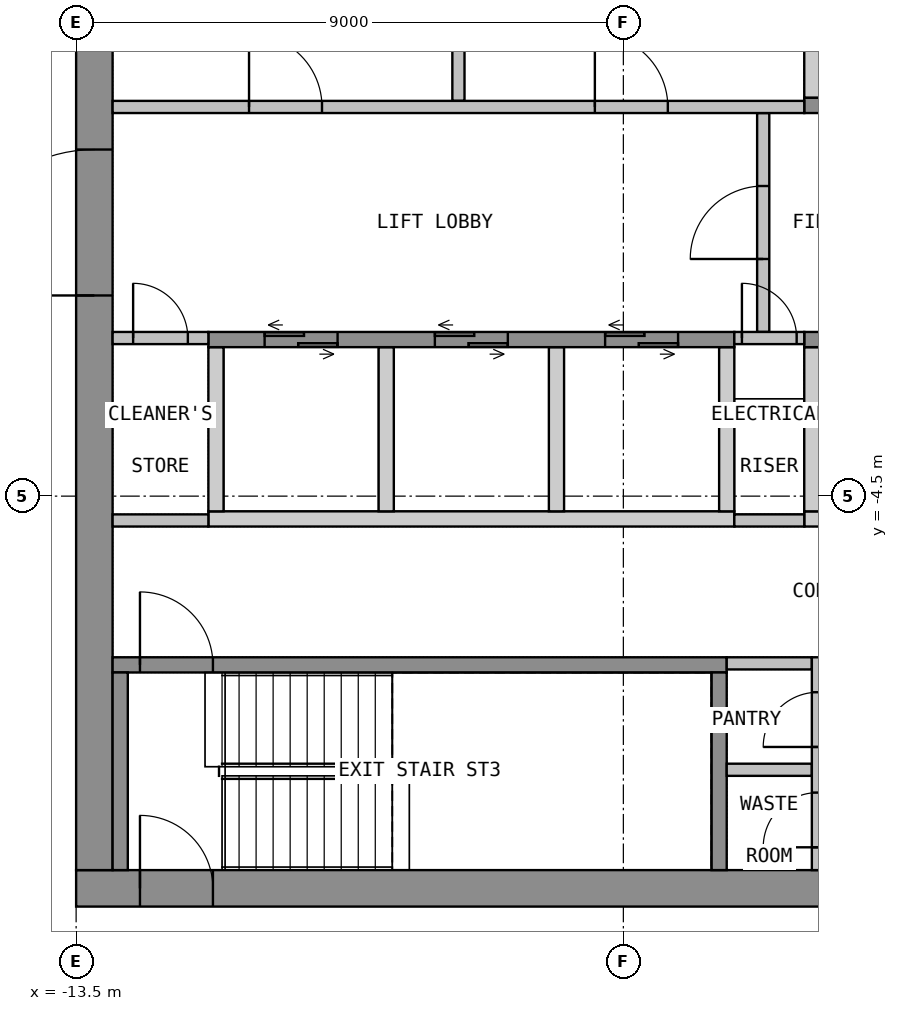
"""IFC4 building model, lengths in metres.
Left out: names, types, materials, properties, quantities, classifications, styles, units other than length and angle.
Written with IfcOpenShell. Run it as: python <this file> out.ifc"""

import sys

from ifc_helpers import new_model, si_unit, direction, frame, frame_2d, origin, place, context, subcontext, project, spatial, polyline, rectangle, outline, extrude, element, fill, save


model = new_model("IFC4")
c1 = context("Model", 3, precision=1e-05, world=origin(), true_north=direction((0.0, 1.0)))
c2 = subcontext(c1, "Body", "Model", "MODEL_VIEW")
j1 = project(units=[si_unit("LENGTHUNIT", "METRE"), si_unit("PLANEANGLEUNIT", "RADIAN")], contexts=[c1])
p1 = place(None, origin())
s1 = spatial("IfcSite", under=j1, at=p1, CompositionType="ELEMENT")
p2 = place(p1, origin())
s2 = spatial("IfcBuilding", under=s1, at=p2, CompositionType="ELEMENT")
p3 = place(p2, frame((0.0, 0.0, 286.5)))
s3 = spatial("IfcBuildingStorey", under=s2, at=p3, CompositionType="ELEMENT", Elevation=286.5)
p4 = place(p3, frame((-13.5, -10.95, 0.0), z_axis=(0.0, 0.0, 1.0), x_axis=(1.0, 0.0, 0.0)))
e1 = element("IfcWall", 1, at=p4, inside=s3, PredefinedType="SHEAR", context=c2, shape_type="SweptSolid", body=[
    extrude(rectangle(XDim=27.0, YDim=0.6, at=frame_2d((13.5, 0.0))), origin(), (0.0, 0.0, 1.0), 3.575),
])
p5 = place(p4, frame((12.3, 0.0, 0.0)))
e2 = element("IfcOpeningElement", 2, at=p5, cuts=e1, PredefinedType="OPENING", context=c2, shape_type="SweptSolid", body=[
    extrude(rectangle(XDim=2.4, YDim=2.1, at=frame_2d((1.2, 1.05))), frame((0.0, 0.31, 0.0), z_axis=(0.0, -1.0, 0.0), x_axis=(1.0, 0.0, 0.0)), (0.0, 0.0, 1.0), 0.62),
])
p6 = place(p4, frame((1.05, 0.0, 0.0)))
e3 = element("IfcOpeningElement", 3, at=p6, cuts=e1, PredefinedType="OPENING", context=c2, shape_type="SweptSolid", body=[
    extrude(rectangle(XDim=1.2, YDim=2.1, at=frame_2d((0.6, 1.05))), frame((0.0, 0.31, 0.0), z_axis=(0.0, -1.0, 0.0), x_axis=(1.0, 0.0, 0.0)), (0.0, 0.0, 1.0), 0.62),
])
p7 = place(p4, frame((24.75, 0.0, 0.0)))
e4 = element("IfcOpeningElement", 4, at=p7, cuts=e1, PredefinedType="OPENING", context=c2, shape_type="SweptSolid", body=[
    extrude(rectangle(XDim=1.2, YDim=2.1, at=frame_2d((0.6, 1.05))), frame((0.0, 0.31, 0.0), z_axis=(0.0, -1.0, 0.0), x_axis=(1.0, 0.0, 0.0)), (0.0, 0.0, 1.0), 0.62),
])
p8 = place(p3, frame((-13.2, -10.65, 0.0), z_axis=(0.0, 0.0, 1.0), x_axis=(0.0, 1.0, 0.0)))
e5 = element("IfcWall", 5, at=p8, inside=s3, PredefinedType="SHEAR", context=c2, shape_type="SweptSolid", body=[
    extrude(rectangle(XDim=21.3, YDim=0.6, at=frame_2d((10.65, 0.0))), origin(), (0.0, 0.0, 1.0), 3.575),
])
p9 = place(p8, frame((9.45, 0.0, 0.0)))
e6 = element("IfcOpeningElement", 6, at=p9, cuts=e5, PredefinedType="OPENING", context=c2, shape_type="SweptSolid", body=[
    extrude(rectangle(XDim=2.4, YDim=2.1, at=frame_2d((1.2, 1.05))), frame((0.0, 0.31, 0.0), z_axis=(0.0, -1.0, 0.0), x_axis=(1.0, 0.0, 0.0)), (0.0, 0.0, 1.0), 0.62),
])
p10 = place(p3, origin())
e7 = element("IfcWall", 7, at=p10, inside=s3, PredefinedType="SHEAR", context=c2, shape_type="SweptSolid", body=[
    extrude(outline(polyline([(-1.525, 2.05), (-1.275, 2.05), (-1.275, 4.75), (-1.525, 4.75), (-1.525, 2.05)])), origin(), (0.0, 0.0, 1.0), 3.575),
])
p11 = place(p3, frame((-1.525, 1.925, 0.0), z_axis=(0.0, 0.0, 1.0), x_axis=(1.0, 0.0, 0.0)))
e8 = element("IfcWall", 8, at=p11, inside=s3, PredefinedType="SHEAR", context=c2, shape_type="SweptSolid", body=[
    extrude(rectangle(XDim=3.05, YDim=0.25, at=frame_2d((1.525, 0.0))), origin(), (0.0, 0.0, 1.0), 3.575),
])
p12 = place(p11, frame((0.925, 0.0, 0.0)))
e9 = element("IfcOpeningElement", 9, at=p12, cuts=e8, PredefinedType="OPENING", context=c2, shape_type="SweptSolid", body=[
    extrude(rectangle(XDim=1.2, YDim=2.1, at=frame_2d((0.6, 1.05))), frame((0.0, 0.135, 0.0), z_axis=(0.0, -1.0, 0.0), x_axis=(1.0, 0.0, 0.0)), (0.0, 0.0, 1.0), 0.27),
])
p13 = place(p3, origin())
e10 = element("IfcWall", 10, at=p13, inside=s3, PredefinedType="SHEAR", context=c2, shape_type="SweptSolid", body=[
    extrude(outline(polyline([(-11.325, -5.0), (-2.675, -5.0), (-2.675, -4.75), (-11.325, -4.75), (-11.325, -5.0)])), origin(), (0.0, 0.0, 1.0), 3.575),
])
p14 = place(p3, origin())
e11 = element("IfcWall", 11, at=p14, inside=s3, PredefinedType="SHEAR", context=c2, shape_type="SweptSolid", body=[
    extrude(outline(polyline([(-1.525, -5.0), (4.325, -5.0), (4.325, -4.75), (-1.525, -4.75), (-1.525, -5.0)])), origin(), (0.0, 0.0, 1.0), 3.575),
])
p15 = place(p3, origin())
e12 = element("IfcWall", 12, at=p15, inside=s3, PredefinedType="SHEAR", context=c2, shape_type="SweptSolid", body=[
    extrude(outline(polyline([(-11.325, -4.75), (-11.075, -4.75), (-11.075, -2.05), (-11.325, -2.05), (-11.325, -4.75)])), origin(), (0.0, 0.0, 1.0), 3.575),
])
p16 = place(p3, origin())
e13 = element("IfcWall", 13, at=p16, inside=s3, PredefinedType="SHEAR", context=c2, shape_type="SweptSolid", body=[
    extrude(outline(polyline([(-8.525, -4.75), (-8.275, -4.75), (-8.275, -2.05), (-8.525, -2.05), (-8.525, -4.75)])), origin(), (0.0, 0.0, 1.0), 3.575),
])
p17 = place(p3, origin())
e14 = element("IfcWall", 14, at=p17, inside=s3, PredefinedType="SHEAR", context=c2, shape_type="SweptSolid", body=[
    extrude(outline(polyline([(-5.725, -4.75), (-5.475, -4.75), (-5.475, -2.05), (-5.725, -2.05), (-5.725, -4.75)])), origin(), (0.0, 0.0, 1.0), 3.575),
])
p18 = place(p3, origin())
e15 = element("IfcWall", 15, at=p18, inside=s3, PredefinedType="SHEAR", context=c2, shape_type="SweptSolid", body=[
    extrude(outline(polyline([(-2.925, -4.75), (-2.675, -4.75), (-2.675, -2.05), (-2.925, -2.05), (-2.925, -4.75)])), origin(), (0.0, 0.0, 1.0), 3.575),
])
p19 = place(p3, origin())
e16 = element("IfcWall", 16, at=p19, inside=s3, PredefinedType="SHEAR", context=c2, shape_type="SweptSolid", body=[
    extrude(outline(polyline([(-1.525, -4.75), (-1.275, -4.75), (-1.275, -2.05), (-1.525, -2.05), (-1.525, -4.75)])), origin(), (0.0, 0.0, 1.0), 3.575),
])
p20 = place(p3, frame((-11.325, -1.925, 0.0), z_axis=(0.0, 0.0, 1.0), x_axis=(1.0, 0.0, 0.0)))
e17 = element("IfcWall", 17, at=p20, inside=s3, PredefinedType="SHEAR", context=c2, shape_type="SweptSolid", body=[
    extrude(rectangle(XDim=8.65, YDim=0.25, at=frame_2d((4.325, 0.0))), origin(), (0.0, 0.0, 1.0), 3.575),
])
p21 = place(p20, frame((0.925, 0.0, 0.0)))
e18 = element("IfcOpeningElement", 18, at=p21, cuts=e17, PredefinedType="OPENING", context=c2, shape_type="SweptSolid", body=[
    extrude(rectangle(XDim=1.2, YDim=2.1, at=frame_2d((0.6, 1.05))), frame((0.0, 0.135, 0.0), z_axis=(0.0, -1.0, 0.0), x_axis=(1.0, 0.0, 0.0)), (0.0, 0.0, 1.0), 0.27),
])
p22 = place(p20, frame((3.725, 0.0, 0.0)))
e19 = element("IfcOpeningElement", 19, at=p22, cuts=e17, PredefinedType="OPENING", context=c2, shape_type="SweptSolid", body=[
    extrude(rectangle(XDim=1.2, YDim=2.1, at=frame_2d((0.6, 1.05))), frame((0.0, 0.135, 0.0), z_axis=(0.0, -1.0, 0.0), x_axis=(1.0, 0.0, 0.0)), (0.0, 0.0, 1.0), 0.27),
])
p23 = place(p20, frame((6.525, 0.0, 0.0)))
e20 = element("IfcOpeningElement", 20, at=p23, cuts=e17, PredefinedType="OPENING", context=c2, shape_type="SweptSolid", body=[
    extrude(rectangle(XDim=1.2, YDim=2.1, at=frame_2d((0.6, 1.05))), frame((0.0, 0.135, 0.0), z_axis=(0.0, -1.0, 0.0), x_axis=(1.0, 0.0, 0.0)), (0.0, 0.0, 1.0), 0.27),
])
p24 = place(p3, frame((-1.525, -1.925, 0.0), z_axis=(0.0, 0.0, 1.0), x_axis=(1.0, 0.0, 0.0)))
e21 = element("IfcWall", 21, at=p24, inside=s3, PredefinedType="SHEAR", context=c2, shape_type="SweptSolid", body=[
    extrude(rectangle(XDim=5.85, YDim=0.25, at=frame_2d((2.925, 0.0))), origin(), (0.0, 0.0, 1.0), 3.575),
])
p25 = place(p24, frame((0.925, 0.0, 0.0)))
e22 = element("IfcOpeningElement", 22, at=p25, cuts=e21, PredefinedType="OPENING", context=c2, shape_type="SweptSolid", body=[
    extrude(rectangle(XDim=1.2, YDim=2.1, at=frame_2d((0.6, 1.05))), frame((0.0, 0.135, 0.0), z_axis=(0.0, -1.0, 0.0), x_axis=(1.0, 0.0, 0.0)), (0.0, 0.0, 1.0), 0.27),
])
p26 = place(p24, frame((3.725, 0.0, 0.0)))
e23 = element("IfcOpeningElement", 23, at=p26, cuts=e21, PredefinedType="OPENING", context=c2, shape_type="SweptSolid", body=[
    extrude(rectangle(XDim=1.2, YDim=2.1, at=frame_2d((0.6, 1.05))), frame((0.0, 0.135, 0.0), z_axis=(0.0, -1.0, 0.0), x_axis=(1.0, 0.0, 0.0)), (0.0, 0.0, 1.0), 0.27),
])
p27 = place(p3, frame((-2.2, -1.8, 0.0), z_axis=(0.0, 0.0, 1.0), x_axis=(0.0, 1.0, 0.0)))
e24 = element("IfcWall", 24, at=p27, inside=s3, PredefinedType="PARTITIONING", context=c2, shape_type="SweptSolid", body=[
    extrude(rectangle(XDim=3.6, YDim=0.2, at=frame_2d((1.8, 0.0))), origin(), (0.0, 0.0, 1.0), 3.575),
])
p28 = place(p27, frame((1.2, 0.0, 0.0)))
e25 = element("IfcOpeningElement", 25, at=p28, cuts=e24, PredefinedType="OPENING", context=c2, shape_type="SweptSolid", body=[
    extrude(rectangle(XDim=1.2, YDim=2.1, at=frame_2d((0.6, 1.05))), frame((0.0, 0.11, 0.0), z_axis=(0.0, -1.0, 0.0), x_axis=(1.0, 0.0, 0.0)), (0.0, 0.0, 1.0), 0.22),
])
p29 = place(p3, frame((-12.9, -7.275, 0.0), z_axis=(0.0, 0.0, 1.0), x_axis=(1.0, 0.0, 0.0)))
e26 = element("IfcWall", 26, at=p29, inside=s3, PredefinedType="SHEAR", context=c2, shape_type="SweptSolid", body=[
    extrude(rectangle(XDim=10.1, YDim=0.25, at=frame_2d((5.05, 0.0))), origin(), (0.0, 0.0, 1.0), 3.575),
])
p30 = place(p29, frame((0.45, 0.0, 0.0)))
e27 = element("IfcOpeningElement", 27, at=p30, cuts=e26, PredefinedType="OPENING", context=c2, shape_type="SweptSolid", body=[
    extrude(rectangle(XDim=1.2, YDim=2.1, at=frame_2d((0.6, 1.05))), frame((0.0, 0.135, 0.0), z_axis=(0.0, -1.0, 0.0), x_axis=(1.0, 0.0, 0.0)), (0.0, 0.0, 1.0), 0.27),
])
for number, where, z_axis, x_axis in (
    (28, (-12.775, -10.65, 0.0), (0.0, 0.0, 1.0), (0.0, 1.0, 0.0)),
    (29, (-2.925, -10.65, 0.0), (0.0, 0.0, 1.0), (0.0, 1.0, 0.0)),
):
    element("IfcWall", number, at=place(p3, frame(where, z_axis=z_axis, x_axis=x_axis)), inside=s3, PredefinedType="SHEAR", context=c2, shape_type="SweptSolid", body=[
        extrude(rectangle(XDim=3.25, YDim=0.25, at=frame_2d((1.625, 0.0))), origin(), (0.0, 0.0, 1.0), 3.575),
    ])
for number, where, z_axis, x_axis in (
    (30, (-2.8, -7.25, 0.0), (0.0, 0.0, 1.0), (1.0, 0.0, 0.0)),
    (31, (-2.8, -9.0, 0.0), (0.0, 0.0, 1.0), (1.0, 0.0, 0.0)),
):
    element("IfcWall", number, at=place(p3, frame(where, z_axis=z_axis, x_axis=x_axis)), inside=s3, PredefinedType="PARTITIONING", context=c2, shape_type="SweptSolid", body=[
        extrude(rectangle(XDim=1.4, YDim=0.2, at=frame_2d((0.7, 0.0))), origin(), (0.0, 0.0, 1.0), 3.575),
    ])
p31 = place(p3, frame((-1.3, -10.65, 0.0), z_axis=(0.0, 0.0, 1.0), x_axis=(0.0, 1.0, 0.0)))
e32 = element("IfcWall", 32, at=p31, inside=s3, PredefinedType="PARTITIONING", context=c2, shape_type="SweptSolid", body=[
    extrude(rectangle(XDim=3.5, YDim=0.2, at=frame_2d((1.75, 0.0))), origin(), (0.0, 0.0, 1.0), 3.575),
])
p32 = place(p31, frame((0.375, 0.0, 0.0)))
e33 = element("IfcOpeningElement", 33, at=p32, cuts=e32, PredefinedType="OPENING", context=c2, shape_type="SweptSolid", body=[
    extrude(rectangle(XDim=0.9, YDim=2.1, at=frame_2d((0.45, 1.05))), frame((0.0, 0.11, 0.0), z_axis=(0.0, -1.0, 0.0), x_axis=(1.0, 0.0, 0.0)), (0.0, 0.0, 1.0), 0.22),
])
p33 = place(p31, frame((2.025, 0.0, 0.0)))
e34 = element("IfcOpeningElement", 34, at=p33, cuts=e32, PredefinedType="OPENING", context=c2, shape_type="SweptSolid", body=[
    extrude(rectangle(XDim=0.9, YDim=2.1, at=frame_2d((0.45, 1.05))), frame((0.0, 0.11, 0.0), z_axis=(0.0, -1.0, 0.0), x_axis=(1.0, 0.0, 0.0)), (0.0, 0.0, 1.0), 0.22),
])
p34 = place(p3, frame((-7.212, 2.0, 0.0), z_axis=(0.0, 0.0, 1.0), x_axis=(0.0, 1.0, 0.0)))
e35 = element("IfcWall", 35, at=p34, inside=s3, PredefinedType="PARTITIONING", context=c2, shape_type="SweptSolid", body=[
    extrude(rectangle(XDim=2.8, YDim=0.2, at=frame_2d((1.4, 0.0))), origin(), (0.0, 0.0, 1.0), 3.575),
])
p35 = place(p3, frame((-12.9, 1.9, 0.0), z_axis=(0.0, 0.0, 1.0), x_axis=(1.0, 0.0, 0.0)))
e36 = element("IfcWall", 36, at=p35, inside=s3, PredefinedType="PARTITIONING", context=c2, shape_type="SweptSolid", body=[
    extrude(rectangle(XDim=11.375, YDim=0.2, at=frame_2d((5.688, 0.0))), origin(), (0.0, 0.0, 1.0), 3.575),
])
p36 = place(p35, frame((2.244, 0.0, 0.0)))
e37 = element("IfcOpeningElement", 37, at=p36, cuts=e36, PredefinedType="OPENING", context=c2, shape_type="SweptSolid", body=[
    extrude(rectangle(XDim=1.2, YDim=2.1, at=frame_2d((0.6, 1.05))), frame((0.0, 0.11, 0.0), z_axis=(0.0, -1.0, 0.0), x_axis=(1.0, 0.0, 0.0)), (0.0, 0.0, 1.0), 0.22),
])
p37 = place(p35, frame((7.931, 0.0, 0.0)))
e38 = element("IfcOpeningElement", 38, at=p37, cuts=e36, PredefinedType="OPENING", context=c2, shape_type="SweptSolid", body=[
    extrude(rectangle(XDim=1.2, YDim=2.1, at=frame_2d((0.6, 1.05))), frame((0.0, 0.11, 0.0), z_axis=(0.0, -1.0, 0.0), x_axis=(1.0, 0.0, 0.0)), (0.0, 0.0, 1.0), 0.22),
])
p38 = place(p3, frame((-12.9, -1.9, 0.0), z_axis=(0.0, 0.0, 1.0), x_axis=(1.0, 0.0, 0.0)))
e39 = element("IfcWall", 39, at=p38, inside=s3, PredefinedType="PARTITIONING", context=c2, shape_type="SweptSolid", body=[
    extrude(rectangle(XDim=1.575, YDim=0.2, at=frame_2d((0.788, 0.0))), origin(), (0.0, 0.0, 1.0), 3.575),
])
p39 = place(p38, frame((0.337, 0.0, 0.0)))
e40 = element("IfcOpeningElement", 40, at=p39, cuts=e39, PredefinedType="OPENING", context=c2, shape_type="SweptSolid", body=[
    extrude(rectangle(XDim=0.9, YDim=2.1, at=frame_2d((0.45, 1.05))), frame((0.0, 0.11, 0.0), z_axis=(0.0, -1.0, 0.0), x_axis=(1.0, 0.0, 0.0)), (0.0, 0.0, 1.0), 0.22),
])
p40 = place(p3, frame((-12.9, -4.9, 0.0), z_axis=(0.0, 0.0, 1.0), x_axis=(1.0, 0.0, 0.0)))
e41 = element("IfcWall", 41, at=p40, inside=s3, PredefinedType="PARTITIONING", context=c2, shape_type="SweptSolid", body=[
    extrude(rectangle(XDim=1.575, YDim=0.2, at=frame_2d((0.788, 0.0))), origin(), (0.0, 0.0, 1.0), 3.575),
])
p41 = place(p3, frame((-2.675, -1.9, 0.0), z_axis=(0.0, 0.0, 1.0), x_axis=(1.0, 0.0, 0.0)))
e42 = element("IfcWall", 42, at=p41, inside=s3, PredefinedType="PARTITIONING", context=c2, shape_type="SweptSolid", body=[
    extrude(rectangle(XDim=1.15, YDim=0.2, at=frame_2d((0.575, 0.0))), origin(), (0.0, 0.0, 1.0), 3.575),
])
p42 = place(p41, frame((0.125, 0.0, 0.0)))
e43 = element("IfcOpeningElement", 43, at=p42, cuts=e42, PredefinedType="OPENING", context=c2, shape_type="SweptSolid", body=[
    extrude(rectangle(XDim=0.9, YDim=2.1, at=frame_2d((0.45, 1.05))), frame((0.0, 0.11, 0.0), z_axis=(0.0, -1.0, 0.0), x_axis=(1.0, 0.0, 0.0)), (0.0, 0.0, 1.0), 0.22),
])
p43 = place(p3, frame((-2.675, -4.9, 0.0), z_axis=(0.0, 0.0, 1.0), x_axis=(1.0, 0.0, 0.0)))
e44 = element("IfcWall", 44, at=p43, inside=s3, PredefinedType="PARTITIONING", context=c2, shape_type="SweptSolid", body=[
    extrude(rectangle(XDim=1.15, YDim=0.2, at=frame_2d((0.575, 0.0))), origin(), (0.0, 0.0, 1.0), 3.575),
])
p44 = place(p9, origin())
e45 = element("IfcDoor", 45, at=p44, inside=s3, OperationType="DOUBLE_DOOR_DOUBLE_SWING", PredefinedType="DOOR", context=c2, shape_type="SweptSolid", body=[
    extrude(rectangle(XDim=2.4, YDim=2.1, at=frame_2d((1.2, 1.05))), frame((0.0, 0.025, 0.0), z_axis=(0.0, -1.0, 0.0), x_axis=(1.0, 0.0, 0.0)), (0.0, 0.0, 1.0), 0.05),
])
fill(e6, e45)
p45 = place(p6, origin())
e46 = element("IfcDoor", 46, at=p45, inside=s3, OperationType="SINGLE_SWING_RIGHT", PredefinedType="DOOR", context=c2, shape_type="SweptSolid", body=[
    extrude(rectangle(XDim=1.2, YDim=2.1, at=frame_2d((0.6, 1.05))), frame((0.0, 0.025, 0.0), z_axis=(0.0, -1.0, 0.0), x_axis=(1.0, 0.0, 0.0)), (0.0, 0.0, 1.0), 0.05),
])
fill(e3, e46)
p46 = place(p21, origin())
e47 = element("IfcDoor", 47, at=p46, inside=s3, OperationType="DOUBLE_DOOR_SLIDING", PredefinedType="DOOR", context=c2, shape_type="SweptSolid", body=[
    extrude(rectangle(XDim=1.2, YDim=2.1, at=frame_2d((0.6, 1.05))), frame((0.0, 0.025, 0.0), z_axis=(0.0, -1.0, 0.0), x_axis=(1.0, 0.0, 0.0)), (0.0, 0.0, 1.0), 0.05),
])
fill(e18, e47)
p47 = place(p22, origin())
e48 = element("IfcDoor", 48, at=p47, inside=s3, OperationType="DOUBLE_DOOR_SLIDING", PredefinedType="DOOR", context=c2, shape_type="SweptSolid", body=[
    extrude(rectangle(XDim=1.2, YDim=2.1, at=frame_2d((0.6, 1.05))), frame((0.0, 0.025, 0.0), z_axis=(0.0, -1.0, 0.0), x_axis=(1.0, 0.0, 0.0)), (0.0, 0.0, 1.0), 0.05),
])
fill(e19, e48)
p48 = place(p23, origin())
e49 = element("IfcDoor", 49, at=p48, inside=s3, OperationType="DOUBLE_DOOR_SLIDING", PredefinedType="DOOR", context=c2, shape_type="SweptSolid", body=[
    extrude(rectangle(XDim=1.2, YDim=2.1, at=frame_2d((0.6, 1.05))), frame((0.0, 0.025, 0.0), z_axis=(0.0, -1.0, 0.0), x_axis=(1.0, 0.0, 0.0)), (0.0, 0.0, 1.0), 0.05),
])
fill(e20, e49)
p49 = place(p28, origin())
e50 = element("IfcDoor", 50, at=p49, inside=s3, OperationType="SINGLE_SWING_LEFT", PredefinedType="DOOR", context=c2, shape_type="SweptSolid", body=[
    extrude(rectangle(XDim=1.2, YDim=2.1, at=frame_2d((0.6, 1.05))), frame((0.0, 0.025, 0.0), z_axis=(0.0, -1.0, 0.0), x_axis=(1.0, 0.0, 0.0)), (0.0, 0.0, 1.0), 0.05),
])
fill(e25, e50)
p50 = place(p30, origin())
e51 = element("IfcDoor", 51, at=p50, inside=s3, OperationType="SINGLE_SWING_LEFT", PredefinedType="DOOR", context=c2, shape_type="SweptSolid", body=[
    extrude(rectangle(XDim=1.2, YDim=2.1, at=frame_2d((0.6, 1.05))), frame((0.0, 0.025, 0.0), z_axis=(0.0, -1.0, 0.0), x_axis=(1.0, 0.0, 0.0)), (0.0, 0.0, 1.0), 0.05),
])
fill(e27, e51)
p51 = place(p32, origin())
e52 = element("IfcDoor", 52, at=p51, inside=s3, OperationType="SINGLE_SWING_LEFT", PredefinedType="DOOR", context=c2, shape_type="SweptSolid", body=[
    extrude(rectangle(XDim=0.9, YDim=2.1, at=frame_2d((0.45, 1.05))), frame((0.0, 0.025, 0.0), z_axis=(0.0, -1.0, 0.0), x_axis=(1.0, 0.0, 0.0)), (0.0, 0.0, 1.0), 0.05),
])
fill(e33, e52)
p52 = place(p33, origin())
e53 = element("IfcDoor", 53, at=p52, inside=s3, OperationType="SINGLE_SWING_LEFT", PredefinedType="DOOR", context=c2, shape_type="SweptSolid", body=[
    extrude(rectangle(XDim=0.9, YDim=2.1, at=frame_2d((0.45, 1.05))), frame((0.0, 0.025, 0.0), z_axis=(0.0, -1.0, 0.0), x_axis=(1.0, 0.0, 0.0)), (0.0, 0.0, 1.0), 0.05),
])
fill(e34, e53)
p53 = place(p36, origin())
e54 = element("IfcDoor", 54, at=p53, inside=s3, OperationType="SINGLE_SWING_RIGHT", PredefinedType="DOOR", context=c2, shape_type="SweptSolid", body=[
    extrude(rectangle(XDim=1.2, YDim=2.1, at=frame_2d((0.6, 1.05))), frame((0.0, 0.025, 0.0), z_axis=(0.0, -1.0, 0.0), x_axis=(1.0, 0.0, 0.0)), (0.0, 0.0, 1.0), 0.05),
])
fill(e37, e54)
p54 = place(p37, origin())
e55 = element("IfcDoor", 55, at=p54, inside=s3, OperationType="SINGLE_SWING_RIGHT", PredefinedType="DOOR", context=c2, shape_type="SweptSolid", body=[
    extrude(rectangle(XDim=1.2, YDim=2.1, at=frame_2d((0.6, 1.05))), frame((0.0, 0.025, 0.0), z_axis=(0.0, -1.0, 0.0), x_axis=(1.0, 0.0, 0.0)), (0.0, 0.0, 1.0), 0.05),
])
fill(e38, e55)
p55 = place(p39, origin())
e56 = element("IfcDoor", 56, at=p55, inside=s3, OperationType="SINGLE_SWING_LEFT", PredefinedType="DOOR", context=c2, shape_type="SweptSolid", body=[
    extrude(rectangle(XDim=0.9, YDim=2.1, at=frame_2d((0.45, 1.05))), frame((0.0, 0.025, 0.0), z_axis=(0.0, -1.0, 0.0), x_axis=(1.0, 0.0, 0.0)), (0.0, 0.0, 1.0), 0.05),
])
fill(e40, e56)
p56 = place(p42, origin())
e57 = element("IfcDoor", 57, at=p56, inside=s3, OperationType="SINGLE_SWING_LEFT", PredefinedType="DOOR", context=c2, shape_type="SweptSolid", body=[
    extrude(rectangle(XDim=0.9, YDim=2.1, at=frame_2d((0.45, 1.05))), frame((0.0, 0.025, 0.0), z_axis=(0.0, -1.0, 0.0), x_axis=(1.0, 0.0, 0.0)), (0.0, 0.0, 1.0), 0.05),
])
fill(e43, e57)
save(model, sys.argv[1])
